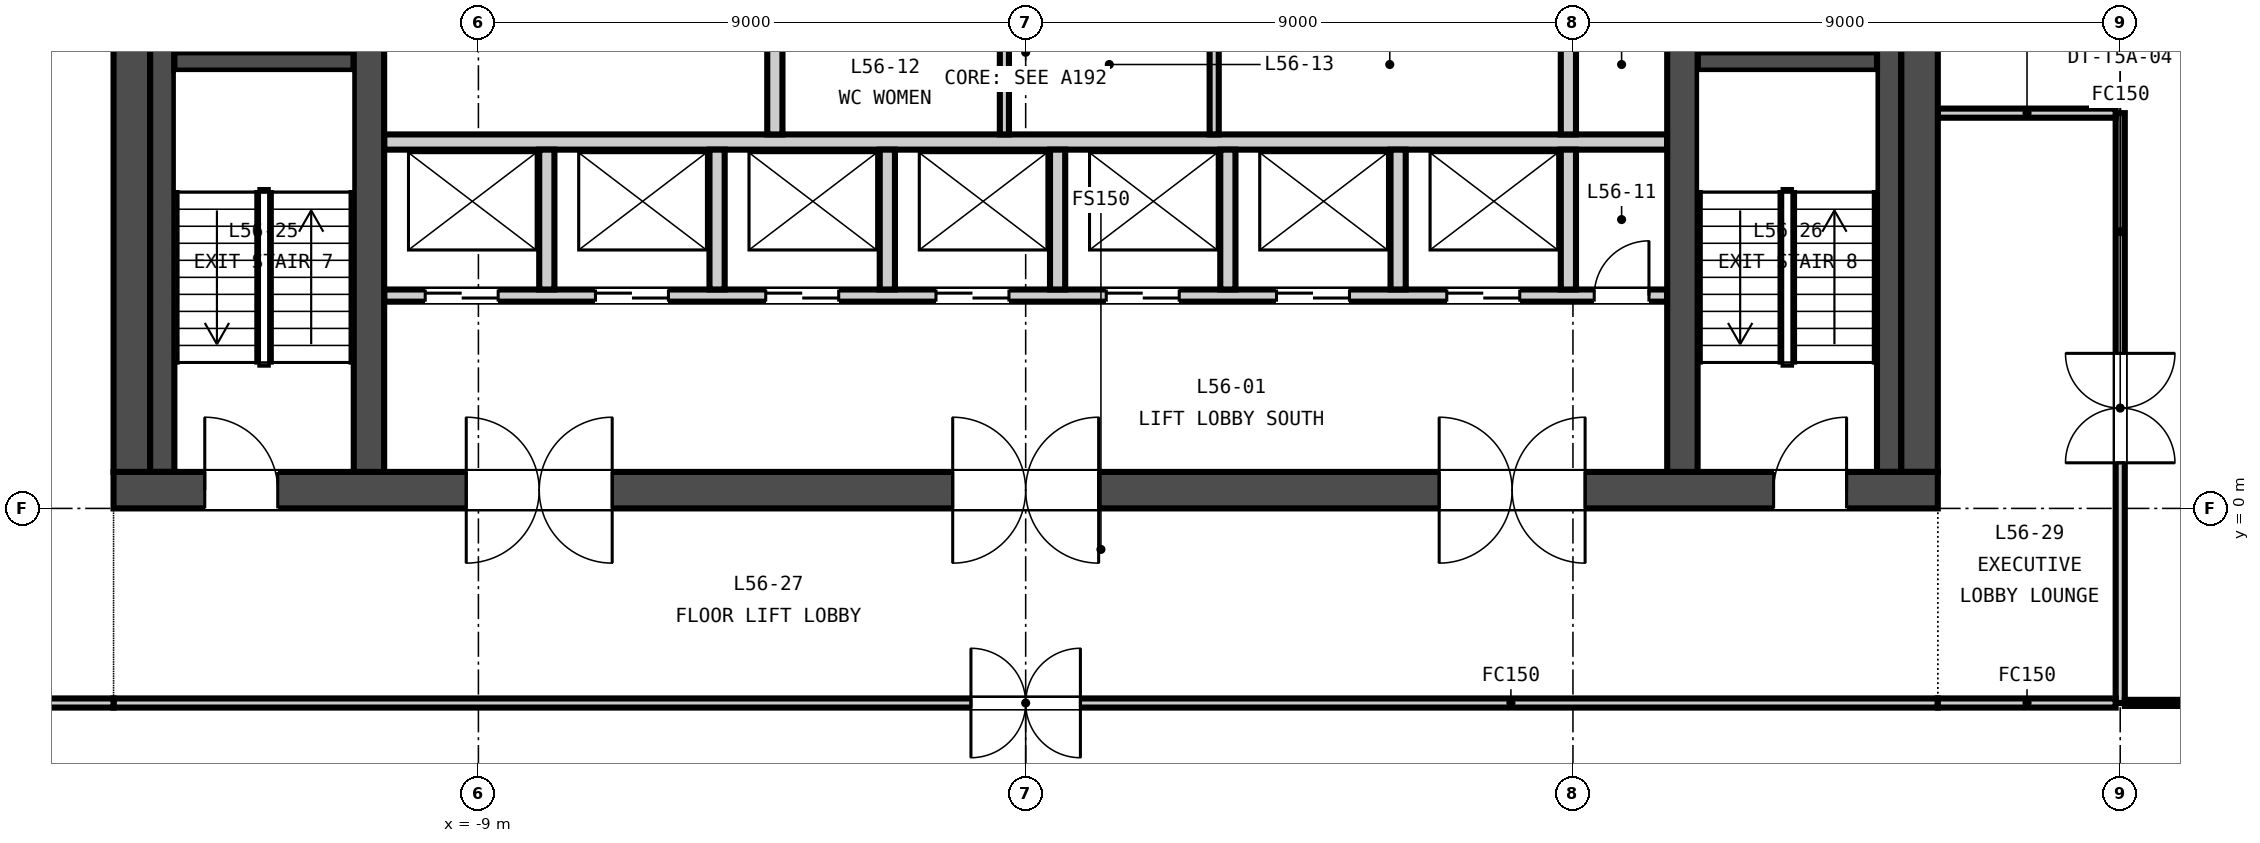
"""IFC4 building model, lengths in metres.
Left out: names, types, materials, properties, quantities, classifications, styles, units other than length and angle.
Written with IfcOpenShell. Run it as: python <this file> out.ifc"""

import sys

from ifc_helpers import new_model, si_unit, direction, frame, frame_2d, origin, place, context, subcontext, project, spatial, rectangle, extrude, element, fill, save


model = new_model("IFC4")
c1 = context("Model", 3, precision=1e-05, world=origin(), true_north=direction((0.0, 1.0)))
c2 = subcontext(c1, "Body", "Model", "MODEL_VIEW")
j1 = project(units=[si_unit("LENGTHUNIT", "METRE"), si_unit("PLANEANGLEUNIT", "RADIAN")], contexts=[c1])
p1 = place(None, origin())
s1 = spatial("IfcSite", under=j1, at=p1, CompositionType="ELEMENT")
p2 = place(p1, origin())
s2 = spatial("IfcBuilding", under=s1, at=p2, CompositionType="ELEMENT")
p3 = place(p2, frame((0.0, 0.0, 223.6)))
s3 = spatial("IfcBuildingStorey", under=s2, at=p3, CompositionType="ELEMENT", Elevation=223.6)
p4 = place(p3, frame((-15.0, 0.3, -0.15), z_axis=(0.0, 0.0, 1.0), x_axis=(1.0, 0.0, 0.0)))
e1 = element("IfcWall", 1, at=p4, inside=s3, PredefinedType="SOLIDWALL", context=c2, shape_type="SweptSolid", body=[
    extrude(rectangle(XDim=30.0, YDim=0.6, at=frame_2d((15.0, 0.0))), origin(), (0.0, 0.0, 1.0), 3.65),
])
p5 = place(p4, frame((5.8, 0.0, 0.15)))
e2 = element("IfcOpeningElement", 2, at=p5, cuts=e1, PredefinedType="OPENING", context=c2, shape_type="SweptSolid", body=[
    extrude(rectangle(XDim=2.4, YDim=2.4, at=frame_2d((1.2, 1.2))), frame((0.0, 0.31, 0.0), z_axis=(0.0, -1.0, 0.0), x_axis=(1.0, 0.0, 0.0)), (0.0, 0.0, 1.0), 0.62),
])
p6 = place(p4, frame((13.8, 0.0, 0.15)))
e3 = element("IfcOpeningElement", 3, at=p6, cuts=e1, PredefinedType="OPENING", context=c2, shape_type="SweptSolid", body=[
    extrude(rectangle(XDim=2.4, YDim=2.4, at=frame_2d((1.2, 1.2))), frame((0.0, 0.31, 0.0), z_axis=(0.0, -1.0, 0.0), x_axis=(1.0, 0.0, 0.0)), (0.0, 0.0, 1.0), 0.62),
])
p7 = place(p4, frame((21.8, 0.0, 0.15)))
e4 = element("IfcOpeningElement", 4, at=p7, cuts=e1, PredefinedType="OPENING", context=c2, shape_type="SweptSolid", body=[
    extrude(rectangle(XDim=2.4, YDim=2.4, at=frame_2d((1.2, 1.2))), frame((0.0, 0.31, 0.0), z_axis=(0.0, -1.0, 0.0), x_axis=(1.0, 0.0, 0.0)), (0.0, 0.0, 1.0), 0.62),
])
p8 = place(p4, frame((1.5, 0.0, 0.15)))
e5 = element("IfcOpeningElement", 5, at=p8, cuts=e1, PredefinedType="OPENING", context=c2, shape_type="SweptSolid", body=[
    extrude(rectangle(XDim=1.2, YDim=2.1, at=frame_2d((0.6, 1.05))), frame((0.0, 0.31, 0.0), z_axis=(0.0, -1.0, 0.0), x_axis=(1.0, 0.0, 0.0)), (0.0, 0.0, 1.0), 0.62),
])
p9 = place(p4, frame((27.3, 0.0, 0.15)))
e6 = element("IfcOpeningElement", 6, at=p9, cuts=e1, PredefinedType="OPENING", context=c2, shape_type="SweptSolid", body=[
    extrude(rectangle(XDim=1.2, YDim=2.1, at=frame_2d((0.6, 1.05))), frame((0.0, 0.31, 0.0), z_axis=(0.0, -1.0, 0.0), x_axis=(1.0, 0.0, 0.0)), (0.0, 0.0, 1.0), 0.62),
])
for number, where, z_axis, x_axis in (
    (7, (-14.7, 0.6, -0.15), (0.0, 0.0, 1.0), (0.0, 1.0, 0.0)),
    (8, (14.7, 0.6, -0.15), (0.0, 0.0, 1.0), (0.0, 1.0, 0.0)),
):
    element("IfcWall", number, at=place(p3, frame(where, z_axis=z_axis, x_axis=x_axis)), inside=s3, PredefinedType="SOLIDWALL", context=c2, shape_type="SweptSolid", body=[
        extrude(rectangle(XDim=13.8, YDim=0.6, at=frame_2d((6.9, 0.0))), origin(), (0.0, 0.0, 1.0), 3.65),
    ])
for number, where, z_axis, x_axis in (
    (9, (-10.8, 0.6, -0.15), (0.0, 0.0, 1.0), (0.0, 1.0, 0.0)),
    (10, (10.8, 0.6, -0.15), (0.0, 0.0, 1.0), (0.0, 1.0, 0.0)),
):
    element("IfcWall", number, at=place(p3, frame(where, z_axis=z_axis, x_axis=x_axis)), inside=s3, PredefinedType="SOLIDWALL", context=c2, shape_type="SweptSolid", body=[
        extrude(rectangle(XDim=13.8, YDim=0.5, at=frame_2d((6.9, 0.0))), origin(), (0.0, 0.0, 1.0), 3.65),
    ])
p10 = place(p3, frame((-10.55, 3.5, 0.0), z_axis=(0.0, 0.0, 1.0), x_axis=(1.0, 0.0, 0.0)))
e11 = element("IfcWall", 11, at=p10, inside=s3, PredefinedType="PARTITIONING", context=c2, shape_type="SweptSolid", body=[
    extrude(rectangle(XDim=21.1, YDim=0.2, at=frame_2d((10.55, 0.0))), origin(), (0.0, 0.0, 1.0), 3.5),
])
p11 = place(p10, frame((0.675, 0.0, 0.0)))
e12 = element("IfcOpeningElement", 12, at=p11, cuts=e11, PredefinedType="OPENING", context=c2, shape_type="SweptSolid", body=[
    extrude(rectangle(XDim=1.2, YDim=2.1, at=frame_2d((0.6, 1.05))), frame((0.0, 0.11, 0.0), z_axis=(0.0, -1.0, 0.0), x_axis=(1.0, 0.0, 0.0)), (0.0, 0.0, 1.0), 0.22),
])
p12 = place(p10, frame((3.475, 0.0, 0.0)))
e13 = element("IfcOpeningElement", 13, at=p12, cuts=e11, PredefinedType="OPENING", context=c2, shape_type="SweptSolid", body=[
    extrude(rectangle(XDim=1.2, YDim=2.1, at=frame_2d((0.6, 1.05))), frame((0.0, 0.11, 0.0), z_axis=(0.0, -1.0, 0.0), x_axis=(1.0, 0.0, 0.0)), (0.0, 0.0, 1.0), 0.22),
])
p13 = place(p10, frame((6.275, 0.0, 0.0)))
e14 = element("IfcOpeningElement", 14, at=p13, cuts=e11, PredefinedType="OPENING", context=c2, shape_type="SweptSolid", body=[
    extrude(rectangle(XDim=1.2, YDim=2.1, at=frame_2d((0.6, 1.05))), frame((0.0, 0.11, 0.0), z_axis=(0.0, -1.0, 0.0), x_axis=(1.0, 0.0, 0.0)), (0.0, 0.0, 1.0), 0.22),
])
p14 = place(p10, frame((9.075, 0.0, 0.0)))
e15 = element("IfcOpeningElement", 15, at=p14, cuts=e11, PredefinedType="OPENING", context=c2, shape_type="SweptSolid", body=[
    extrude(rectangle(XDim=1.2, YDim=2.1, at=frame_2d((0.6, 1.05))), frame((0.0, 0.11, 0.0), z_axis=(0.0, -1.0, 0.0), x_axis=(1.0, 0.0, 0.0)), (0.0, 0.0, 1.0), 0.22),
])
p15 = place(p10, frame((11.875, 0.0, 0.0)))
e16 = element("IfcOpeningElement", 16, at=p15, cuts=e11, PredefinedType="OPENING", context=c2, shape_type="SweptSolid", body=[
    extrude(rectangle(XDim=1.2, YDim=2.1, at=frame_2d((0.6, 1.05))), frame((0.0, 0.11, 0.0), z_axis=(0.0, -1.0, 0.0), x_axis=(1.0, 0.0, 0.0)), (0.0, 0.0, 1.0), 0.22),
])
p16 = place(p10, frame((14.675, 0.0, 0.0)))
e17 = element("IfcOpeningElement", 17, at=p16, cuts=e11, PredefinedType="OPENING", context=c2, shape_type="SweptSolid", body=[
    extrude(rectangle(XDim=1.2, YDim=2.1, at=frame_2d((0.6, 1.05))), frame((0.0, 0.11, 0.0), z_axis=(0.0, -1.0, 0.0), x_axis=(1.0, 0.0, 0.0)), (0.0, 0.0, 1.0), 0.22),
])
p17 = place(p10, frame((17.475, 0.0, 0.0)))
e18 = element("IfcOpeningElement", 18, at=p17, cuts=e11, PredefinedType="OPENING", context=c2, shape_type="SweptSolid", body=[
    extrude(rectangle(XDim=1.2, YDim=2.1, at=frame_2d((0.6, 1.05))), frame((0.0, 0.11, 0.0), z_axis=(0.0, -1.0, 0.0), x_axis=(1.0, 0.0, 0.0)), (0.0, 0.0, 1.0), 0.22),
])
p18 = place(p10, frame((19.9, 0.0, 0.0)))
e19 = element("IfcOpeningElement", 19, at=p18, cuts=e11, PredefinedType="OPENING", context=c2, shape_type="SweptSolid", body=[
    extrude(rectangle(XDim=0.9, YDim=2.1, at=frame_2d((0.45, 1.05))), frame((0.0, 0.11, 0.0), z_axis=(0.0, -1.0, 0.0), x_axis=(1.0, 0.0, 0.0)), (0.0, 0.0, 1.0), 0.22),
])
p19 = place(p3, frame((-10.55, 6.025, 0.0), z_axis=(0.0, 0.0, 1.0), x_axis=(1.0, 0.0, 0.0)))
e20 = element("IfcWall", 20, at=p19, inside=s3, PredefinedType="PARTITIONING", context=c2, shape_type="SweptSolid", body=[
    extrude(rectangle(XDim=21.1, YDim=0.25, at=frame_2d((10.55, 0.0))), origin(), (0.0, 0.0, 1.0), 3.5),
])
p20 = place(p3, frame((-4.125, 6.15, 0.0), z_axis=(0.0, 0.0, 1.0), x_axis=(0.0, 1.0, 0.0)))
e21 = element("IfcWall", 21, at=p20, inside=s3, PredefinedType="PARTITIONING", context=c2, shape_type="SweptSolid", body=[
    extrude(rectangle(XDim=4.95, YDim=0.25, at=frame_2d((2.475, 0.0))), origin(), (0.0, 0.0, 1.0), 3.5),
])
p21 = place(p20, frame((3.125, 0.0, 0.0)))
e22 = element("IfcOpeningElement", 22, at=p21, cuts=e21, PredefinedType="OPENING", context=c2, shape_type="SweptSolid", body=[
    extrude(rectangle(XDim=1.2, YDim=2.1, at=frame_2d((0.6, 1.05))), frame((0.0, 0.135, 0.0), z_axis=(0.0, -1.0, 0.0), x_axis=(1.0, 0.0, 0.0)), (0.0, 0.0, 1.0), 0.27),
])
for number, where, z_axis, x_axis in (
    (23, (-7.875, 3.6, 0.0), (0.0, 0.0, 1.0), (0.0, 1.0, 0.0)),
    (24, (-5.075, 3.6, 0.0), (0.0, 0.0, 1.0), (0.0, 1.0, 0.0)),
    (25, (-2.275, 3.6, 0.0), (0.0, 0.0, 1.0), (0.0, 1.0, 0.0)),
    (26, (0.525, 3.6, 0.0), (0.0, 0.0, 1.0), (0.0, 1.0, 0.0)),
    (27, (3.325, 3.6, 0.0), (0.0, 0.0, 1.0), (0.0, 1.0, 0.0)),
    (28, (6.125, 3.6, 0.0), (0.0, 0.0, 1.0), (0.0, 1.0, 0.0)),
    (29, (8.925, 3.6, 0.0), (0.0, 0.0, 1.0), (0.0, 1.0, 0.0)),
):
    element("IfcWall", number, at=place(p3, frame(where, z_axis=z_axis, x_axis=x_axis)), inside=s3, PredefinedType="PARTITIONING", context=c2, shape_type="SweptSolid", body=[
        extrude(rectangle(XDim=2.3, YDim=0.25, at=frame_2d((1.15, 0.0))), origin(), (0.0, 0.0, 1.0), 3.5),
    ])
for number, where, z_axis, x_axis in (
    (30, (-0.35, 6.15, 0.0), (0.0, 0.0, 1.0), (0.0, 1.0, 0.0)),
    (31, (3.1, 6.15, 0.0), (0.0, 0.0, 1.0), (0.0, 1.0, 0.0)),
):
    element("IfcWall", number, at=place(p3, frame(where, z_axis=z_axis, x_axis=x_axis)), inside=s3, PredefinedType="PARTITIONING", context=c2, shape_type="SweptSolid", body=[
        extrude(rectangle(XDim=2.3, YDim=0.15, at=frame_2d((1.15, 0.0))), origin(), (0.0, 0.0, 1.0), 3.5),
    ])
p22 = place(p3, frame((8.925, 6.15, 0.0), z_axis=(0.0, 0.0, 1.0), x_axis=(0.0, 1.0, 0.0)))
e32 = element("IfcWall", 32, at=p22, inside=s3, PredefinedType="PARTITIONING", context=c2, shape_type="SweptSolid", body=[
    extrude(rectangle(XDim=2.3, YDim=0.25, at=frame_2d((1.15, 0.0))), origin(), (0.0, 0.0, 1.0), 3.5),
])
p23 = place(p3, frame((-14.0, 7.35, 0.0), z_axis=(0.0, 0.0, 1.0), x_axis=(1.0, 0.0, 0.0)))
e33 = element("IfcWall", 33, at=p23, inside=s3, PredefinedType="SOLIDWALL", context=c2, shape_type="SweptSolid", body=[
    extrude(rectangle(XDim=2.95, YDim=0.3, at=frame_2d((1.475, 0.0))), origin(), (0.0, 0.0, 1.0), 3.5),
])
p24 = place(p3, frame((-14.2, 0.6, 0.0), z_axis=(0.0, 0.0, 1.0), x_axis=(0.0, 1.0, 0.0)))
e34 = element("IfcWall", 34, at=p24, inside=s3, PredefinedType="SOLIDWALL", context=c2, shape_type="SweptSolid", body=[
    extrude(rectangle(XDim=13.8, YDim=0.4, at=frame_2d((6.9, 0.0))), origin(), (0.0, 0.0, 1.0), 3.5),
])
p25 = place(p3, frame((11.05, 7.35, 0.0), z_axis=(0.0, 0.0, 1.0), x_axis=(1.0, 0.0, 0.0)))
e35 = element("IfcWall", 35, at=p25, inside=s3, PredefinedType="SOLIDWALL", context=c2, shape_type="SweptSolid", body=[
    extrude(rectangle(XDim=2.95, YDim=0.3, at=frame_2d((1.475, 0.0))), origin(), (0.0, 0.0, 1.0), 3.5),
])
p26 = place(p3, frame((14.2, 0.6, 0.0), z_axis=(0.0, 0.0, 1.0), x_axis=(0.0, 1.0, 0.0)))
e36 = element("IfcWall", 36, at=p26, inside=s3, PredefinedType="SOLIDWALL", context=c2, shape_type="SweptSolid", body=[
    extrude(rectangle(XDim=13.8, YDim=0.4, at=frame_2d((6.9, 0.0))), origin(), (0.0, 0.0, 1.0), 3.5),
])
p27 = place(p3, frame((15.0, -3.2, 0.0), z_axis=(0.0, 0.0, 1.0), x_axis=(-1.0, 0.0, 0.0)))
e37 = element("IfcWall", 37, at=p27, inside=s3, PredefinedType="PARTITIONING", context=c2, shape_type="SweptSolid", body=[
    extrude(rectangle(XDim=30.0, YDim=0.15, at=frame_2d((15.0, 0.0))), origin(), (0.0, 0.0, 1.0), 2.75),
])
p28 = place(p27, frame((14.1, 0.0, 0.0)))
e38 = element("IfcOpeningElement", 38, at=p28, cuts=e37, PredefinedType="OPENING", context=c2, shape_type="SweptSolid", body=[
    extrude(rectangle(XDim=1.8, YDim=2.1, at=frame_2d((0.9, 1.05))), frame((0.0, 0.085, 0.0), z_axis=(0.0, -1.0, 0.0), x_axis=(1.0, 0.0, 0.0)), (0.0, 0.0, 1.0), 0.17),
])
p29 = place(p3, frame((-15.0, -3.2, 0.0), z_axis=(0.0, 0.0, 1.0), x_axis=(-1.0, 0.0, 0.0)))
e39 = element("IfcWall", 39, at=p29, inside=s3, PredefinedType="PARTITIONING", context=c2, shape_type="SweptSolid", body=[
    extrude(rectangle(XDim=3.0, YDim=0.15, at=frame_2d((1.5, 0.0))), origin(), (0.0, 0.0, 1.0), 2.75),
])
p30 = place(p3, frame((18.0, 6.5, 0.0), z_axis=(0.0, 0.0, 1.0), x_axis=(0.0, -1.0, 0.0)))
e40 = element("IfcWall", 40, at=p30, inside=s3, PredefinedType="PARTITIONING", context=c2, shape_type="SweptSolid", body=[
    extrude(rectangle(XDim=9.7, YDim=0.15, at=frame_2d((4.85, 0.0))), origin(), (0.0, 0.0, 1.0), 2.75),
])
p31 = place(p30, frame((3.95, 0.0, 0.0)))
e41 = element("IfcOpeningElement", 41, at=p31, cuts=e40, PredefinedType="OPENING", context=c2, shape_type="SweptSolid", body=[
    extrude(rectangle(XDim=1.8, YDim=2.1, at=frame_2d((0.9, 1.05))), frame((0.0, 0.085, 0.0), z_axis=(0.0, -1.0, 0.0), x_axis=(1.0, 0.0, 0.0)), (0.0, 0.0, 1.0), 0.17),
])
for number, where, z_axis, x_axis in (
    (42, (17.925, -3.2, 0.0), (0.0, 0.0, 1.0), (-1.0, 0.0, 0.0)),
    (43, (15.0, 6.5, 0.0), (0.0, 0.0, 1.0), (1.0, 0.0, 0.0)),
):
    element("IfcWall", number, at=place(p3, frame(where, z_axis=z_axis, x_axis=x_axis)), inside=s3, PredefinedType="PARTITIONING", context=c2, shape_type="SweptSolid", body=[
        extrude(rectangle(XDim=2.925, YDim=0.15, at=frame_2d((1.462, 0.0))), origin(), (0.0, 0.0, 1.0), 2.75),
    ])
p32 = place(p3, frame((18.076, -3.198, 0.0), z_axis=(0.0, 0.0, 1.0), x_axis=(1.0, 0.0, 0.0)))
e44 = element("IfcWall", 44, at=p32, inside=s3, PredefinedType="PARTITIONING", context=c2, shape_type="SweptSolid", body=[
    extrude(rectangle(XDim=8.013, YDim=0.1, at=frame_2d((4.007, 0.0))), origin(), (0.0, 0.0, 1.0), 2.75),
])
p33 = place(p11, origin())
e45 = element("IfcDoor", 45, at=p33, inside=s3, OperationType="DOUBLE_DOOR_SLIDING", PredefinedType="DOOR", context=c2, shape_type="SweptSolid", body=[
    extrude(rectangle(XDim=1.2, YDim=2.1, at=frame_2d((0.6, 1.05))), frame((0.0, 0.025, 0.0), z_axis=(0.0, -1.0, 0.0), x_axis=(1.0, 0.0, 0.0)), (0.0, 0.0, 1.0), 0.05),
])
fill(e12, e45)
p34 = place(p12, origin())
e46 = element("IfcDoor", 46, at=p34, inside=s3, OperationType="DOUBLE_DOOR_SLIDING", PredefinedType="DOOR", context=c2, shape_type="SweptSolid", body=[
    extrude(rectangle(XDim=1.2, YDim=2.1, at=frame_2d((0.6, 1.05))), frame((0.0, 0.025, 0.0), z_axis=(0.0, -1.0, 0.0), x_axis=(1.0, 0.0, 0.0)), (0.0, 0.0, 1.0), 0.05),
])
fill(e13, e46)
p35 = place(p13, origin())
e47 = element("IfcDoor", 47, at=p35, inside=s3, OperationType="DOUBLE_DOOR_SLIDING", PredefinedType="DOOR", context=c2, shape_type="SweptSolid", body=[
    extrude(rectangle(XDim=1.2, YDim=2.1, at=frame_2d((0.6, 1.05))), frame((0.0, 0.025, 0.0), z_axis=(0.0, -1.0, 0.0), x_axis=(1.0, 0.0, 0.0)), (0.0, 0.0, 1.0), 0.05),
])
fill(e14, e47)
p36 = place(p14, origin())
e48 = element("IfcDoor", 48, at=p36, inside=s3, OperationType="DOUBLE_DOOR_SLIDING", PredefinedType="DOOR", context=c2, shape_type="SweptSolid", body=[
    extrude(rectangle(XDim=1.2, YDim=2.1, at=frame_2d((0.6, 1.05))), frame((0.0, 0.025, 0.0), z_axis=(0.0, -1.0, 0.0), x_axis=(1.0, 0.0, 0.0)), (0.0, 0.0, 1.0), 0.05),
])
fill(e15, e48)
p37 = place(p15, origin())
e49 = element("IfcDoor", 49, at=p37, inside=s3, OperationType="DOUBLE_DOOR_SLIDING", PredefinedType="DOOR", context=c2, shape_type="SweptSolid", body=[
    extrude(rectangle(XDim=1.2, YDim=2.1, at=frame_2d((0.6, 1.05))), frame((0.0, 0.025, 0.0), z_axis=(0.0, -1.0, 0.0), x_axis=(1.0, 0.0, 0.0)), (0.0, 0.0, 1.0), 0.05),
])
fill(e16, e49)
p38 = place(p16, origin())
e50 = element("IfcDoor", 50, at=p38, inside=s3, OperationType="DOUBLE_DOOR_SLIDING", PredefinedType="DOOR", context=c2, shape_type="SweptSolid", body=[
    extrude(rectangle(XDim=1.2, YDim=2.1, at=frame_2d((0.6, 1.05))), frame((0.0, 0.025, 0.0), z_axis=(0.0, -1.0, 0.0), x_axis=(1.0, 0.0, 0.0)), (0.0, 0.0, 1.0), 0.05),
])
fill(e17, e50)
p39 = place(p17, origin())
e51 = element("IfcDoor", 51, at=p39, inside=s3, OperationType="DOUBLE_DOOR_SLIDING", PredefinedType="DOOR", context=c2, shape_type="SweptSolid", body=[
    extrude(rectangle(XDim=1.2, YDim=2.1, at=frame_2d((0.6, 1.05))), frame((0.0, 0.025, 0.0), z_axis=(0.0, -1.0, 0.0), x_axis=(1.0, 0.0, 0.0)), (0.0, 0.0, 1.0), 0.05),
])
fill(e18, e51)
p40 = place(p18, origin())
e52 = element("IfcDoor", 52, at=p40, inside=s3, OperationType="SINGLE_SWING_RIGHT", PredefinedType="DOOR", context=c2, shape_type="SweptSolid", body=[
    extrude(rectangle(XDim=0.9, YDim=2.1, at=frame_2d((0.45, 1.05))), frame((0.0, 0.025, 0.0), z_axis=(0.0, -1.0, 0.0), x_axis=(1.0, 0.0, 0.0)), (0.0, 0.0, 1.0), 0.05),
])
fill(e19, e52)
p41 = place(p5, origin())
e53 = element("IfcDoor", 53, at=p41, inside=s3, OperationType="DOUBLE_DOOR_DOUBLE_SWING", PredefinedType="DOOR", context=c2, shape_type="SweptSolid", body=[
    extrude(rectangle(XDim=2.4, YDim=2.4, at=frame_2d((1.2, 1.2))), frame((0.0, 0.025, 0.0), z_axis=(0.0, -1.0, 0.0), x_axis=(1.0, 0.0, 0.0)), (0.0, 0.0, 1.0), 0.05),
])
fill(e2, e53)
p42 = place(p6, origin())
e54 = element("IfcDoor", 54, at=p42, inside=s3, OperationType="DOUBLE_DOOR_DOUBLE_SWING", PredefinedType="DOOR", context=c2, shape_type="SweptSolid", body=[
    extrude(rectangle(XDim=2.4, YDim=2.4, at=frame_2d((1.2, 1.2))), frame((0.0, 0.025, 0.0), z_axis=(0.0, -1.0, 0.0), x_axis=(1.0, 0.0, 0.0)), (0.0, 0.0, 1.0), 0.05),
])
fill(e3, e54)
p43 = place(p7, origin())
e55 = element("IfcDoor", 55, at=p43, inside=s3, OperationType="DOUBLE_DOOR_DOUBLE_SWING", PredefinedType="DOOR", context=c2, shape_type="SweptSolid", body=[
    extrude(rectangle(XDim=2.4, YDim=2.4, at=frame_2d((1.2, 1.2))), frame((0.0, 0.025, 0.0), z_axis=(0.0, -1.0, 0.0), x_axis=(1.0, 0.0, 0.0)), (0.0, 0.0, 1.0), 0.05),
])
fill(e4, e55)
p44 = place(p8, origin())
e56 = element("IfcDoor", 56, at=p44, inside=s3, OperationType="SINGLE_SWING_LEFT", PredefinedType="DOOR", context=c2, shape_type="SweptSolid", body=[
    extrude(rectangle(XDim=1.2, YDim=2.1, at=frame_2d((0.6, 1.05))), frame((0.0, 0.025, 0.0), z_axis=(0.0, -1.0, 0.0), x_axis=(1.0, 0.0, 0.0)), (0.0, 0.0, 1.0), 0.05),
])
fill(e5, e56)
p45 = place(p9, origin())
e57 = element("IfcDoor", 57, at=p45, inside=s3, OperationType="SINGLE_SWING_RIGHT", PredefinedType="DOOR", context=c2, shape_type="SweptSolid", body=[
    extrude(rectangle(XDim=1.2, YDim=2.1, at=frame_2d((0.6, 1.05))), frame((0.0, 0.025, 0.0), z_axis=(0.0, -1.0, 0.0), x_axis=(1.0, 0.0, 0.0)), (0.0, 0.0, 1.0), 0.05),
])
fill(e6, e57)
p46 = place(p31, origin())
e58 = element("IfcDoor", 58, at=p46, inside=s3, OperationType="DOUBLE_DOOR_DOUBLE_SWING", PredefinedType="DOOR", context=c2, shape_type="SweptSolid", body=[
    extrude(rectangle(XDim=1.8, YDim=2.1, at=frame_2d((0.9, 1.05))), frame((0.0, 0.025, 0.0), z_axis=(0.0, -1.0, 0.0), x_axis=(1.0, 0.0, 0.0)), (0.0, 0.0, 1.0), 0.05),
])
fill(e41, e58)
p47 = place(p28, origin())
e59 = element("IfcDoor", 59, at=p47, inside=s3, OperationType="DOUBLE_DOOR_DOUBLE_SWING", PredefinedType="DOOR", context=c2, shape_type="SweptSolid", body=[
    extrude(rectangle(XDim=1.8, YDim=2.1, at=frame_2d((0.9, 1.05))), frame((0.0, 0.025, 0.0), z_axis=(0.0, -1.0, 0.0), x_axis=(1.0, 0.0, 0.0)), (0.0, 0.0, 1.0), 0.05),
])
fill(e38, e59)
save(model, sys.argv[1])
